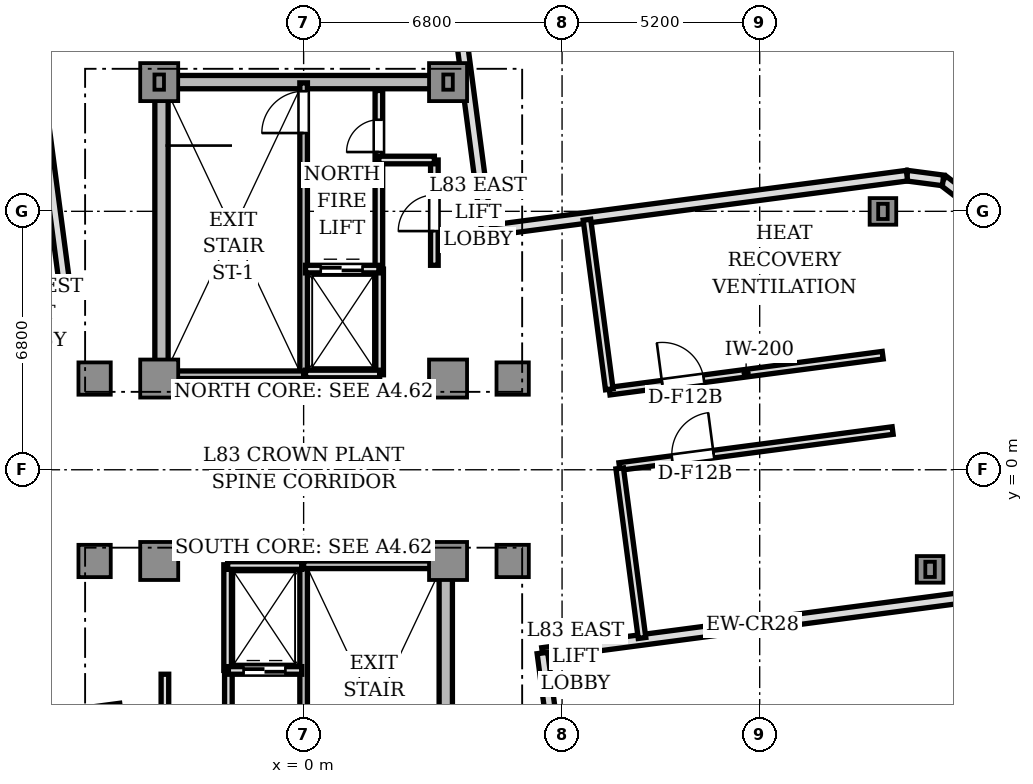
"""IFC4 building model, lengths in metres.
Left out: names, types, materials, properties, quantities, classifications, styles, units other than length and angle.
Written with IfcOpenShell. Run it as: python <this file> out.ifc"""

import sys

from ifc_helpers import new_model, si_unit, direction, frame, frame_2d, origin, origin_2d, place, context, subcontext, project, spatial, polyline, rectangle, i_section, outline, extrude, source, transform, mapped, element, fill, save


model = new_model("IFC4")
c1 = context("Model", 3, precision=1e-05, world=origin(), true_north=direction((0.0, 1.0)))
c2 = subcontext(c1, "Body", "Model", "MODEL_VIEW")
j1 = project(units=[si_unit("LENGTHUNIT", "METRE"), si_unit("PLANEANGLEUNIT", "RADIAN")], contexts=[c1])
p1 = place(None, origin())
s1 = spatial("IfcSite", under=j1, at=p1, CompositionType="ELEMENT")
p2 = place(p1, origin())
s2 = spatial("IfcBuilding", under=s1, at=p2, CompositionType="ELEMENT")
p3 = place(p2, frame((0.0, 0.0, 300.3)))
s3 = spatial("IfcBuildingStorey", under=s2, at=p3, CompositionType="ELEMENT", Elevation=300.3)
p4 = place(p3, frame((-3.55, 10.2, 0.0), z_axis=(0.0, 0.0, 1.0), x_axis=(1.0, 0.0, 0.0)))
e1 = element("IfcWall", 1, at=p4, inside=s3, PredefinedType="SHEAR", context=c2, shape_type="SweptSolid", body=[
    extrude(rectangle(XDim=7.1, YDim=0.35, at=frame_2d((3.55, 0.0))), origin(), (0.0, 0.0, 1.0), 4.25),
])
for number, where, z_axis, x_axis in (
    (2, (-3.74, 2.85, 0.0), (0.0, 0.0, 1.0), (0.0, 1.0, 0.0)),
    (3, (3.74, -9.75, 0.0), (0.0, 0.0, 1.0), (0.0, 1.0, 0.0)),
):
    element("IfcWall", number, at=place(p3, frame(where, z_axis=z_axis, x_axis=x_axis)), inside=s3, PredefinedType="SHEAR", context=c2, shape_type="SweptSolid", body=[
        extrude(rectangle(XDim=6.9, YDim=0.35, at=frame_2d((3.45, 0.0))), origin(), (0.0, 0.0, 1.0), 4.25),
    ])
m1 = source(origin(), c2, "Body", "SweptSolid", [
    extrude(rectangle(XDim=1.0, YDim=1.0, at=origin_2d()), origin(), (0.0, 0.0, 1.0), 4.25),
])
for number, where, z_axis, x_axis in (
    (4, (-3.8, 2.4, 0.0), (0.0, 0.0, 1.0), (1.0, 0.0, 0.0)),
    (5, (3.8, 2.4, 0.0), (0.0, 0.0, 1.0), (1.0, 0.0, 0.0)),
    (6, (-3.8, 10.2, 0.0), (0.0, 0.0, 1.0), (1.0, 0.0, 0.0)),
    (7, (3.8, 10.2, 0.0), (0.0, 0.0, 1.0), (1.0, 0.0, 0.0)),
    (8, (-3.8, -2.4, 0.0), (0.0, 0.0, 1.0), (1.0, 0.0, 0.0)),
    (9, (3.8, -2.4, 0.0), (0.0, 0.0, 1.0), (1.0, 0.0, 0.0)),
):
    element("IfcColumn", number, at=place(p3, frame(where, z_axis=z_axis, x_axis=x_axis)), inside=s3, PredefinedType="COLUMN", context=c2, shape_type="MappedRepresentation", body=[
        mapped(m1, transform((0.0, 0.0, 0.0), scale=1.0)),
    ])
m2 = source(origin(), c2, "Body", "SweptSolid", [
    extrude(rectangle(XDim=0.85, YDim=0.85, at=origin_2d()), origin(), (0.0, 0.0, 1.0), 4.25),
])
for number, where, z_axis, x_axis in (
    (10, (5.5, 2.4, 0.0), (0.0, 0.0, 1.0), (1.0, 0.0, 0.0)),
    (11, (-5.5, 2.4, 0.0), (0.0, 0.0, 1.0), (1.0, 0.0, 0.0)),
    (12, (5.5, -2.4, 0.0), (0.0, 0.0, 1.0), (1.0, 0.0, 0.0)),
    (13, (-5.5, -2.4, 0.0), (0.0, 0.0, 1.0), (1.0, 0.0, 0.0)),
):
    element("IfcColumn", number, at=place(p3, frame(where, z_axis=z_axis, x_axis=x_axis)), inside=s3, PredefinedType="COLUMN", context=c2, shape_type="MappedRepresentation", body=[
        mapped(m2, transform((0.0, 0.0, 0.0), scale=1.0)),
    ])
m3 = source(origin(), c2, "Body", "SweptSolid", [
    extrude(rectangle(XDim=0.7, YDim=0.7, at=origin_2d()), origin(), (0.0, 0.0, 1.0), 4.25),
])
for number, where, z_axis, x_axis in (
    (14, (16.483, -2.621, 0.0), (0.0, 0.0, 1.0), (1.0, 0.0, 0.0)),
    (15, (15.243, 6.798, 0.0), (0.0, 0.0, 1.0), (1.0, 0.0, 0.0)),
):
    element("IfcColumn", number, at=place(p3, frame(where, z_axis=z_axis, x_axis=x_axis)), inside=s3, PredefinedType="COLUMN", context=c2, shape_type="MappedRepresentation", body=[
        mapped(m3, transform((0.0, 0.0, 0.0), scale=1.0)),
    ])
m4 = source(origin(), c2, "Body", "SweptSolid", [
    extrude(i_section(OverallWidth=0.25, OverallDepth=0.4, WebThickness=0.013, FlangeThickness=0.013, FilletRadius=0.014, at=origin_2d()), origin(), (0.0, 0.0, 1.0), 5.959),
])
p5 = place(p3, frame((-3.8, 10.2, 4.25), z_axis=(0.0, 0.0, 1.0), x_axis=(1.0, 0.0, 0.0)))
e16 = element("IfcColumn", 16, at=p5, inside=s3, PredefinedType="COLUMN", context=c2, shape_type="MappedRepresentation", body=[
    mapped(m4, transform((0.0, 0.0, 0.0), scale=1.0)),
])
m5 = source(origin(), c2, "Body", "SweptSolid", [
    extrude(i_section(OverallWidth=0.25, OverallDepth=0.4, WebThickness=0.013, FlangeThickness=0.013, FilletRadius=0.014, at=origin_2d()), origin(), (0.0, 0.0, 1.0), 8.953),
])
p6 = place(p3, frame((3.8, 10.2, 4.25), z_axis=(0.0, 0.0, 1.0), x_axis=(1.0, 0.0, 0.0)))
e17 = element("IfcColumn", 17, at=p6, inside=s3, PredefinedType="COLUMN", context=c2, shape_type="MappedRepresentation", body=[
    mapped(m5, transform((0.0, 0.0, 0.0), scale=1.0)),
])
m6 = source(origin(), c2, "Body", "SweptSolid", [
    extrude(i_section(OverallWidth=0.25, OverallDepth=0.4, WebThickness=0.013, FlangeThickness=0.013, FilletRadius=0.014, at=origin_2d()), origin(), (0.0, 0.0, 1.0), 13.949),
])
p7 = place(p3, frame((16.483, -2.621, 4.25), z_axis=(0.0, 0.0, 1.0), x_axis=(1.0, 0.0, 0.0)))
e18 = element("IfcColumn", 18, at=p7, inside=s3, PredefinedType="COLUMN", context=c2, shape_type="MappedRepresentation", body=[
    mapped(m6, transform((0.0, 0.0, 0.0), scale=1.0)),
])
m7 = source(origin(), c2, "Body", "SweptSolid", [
    extrude(i_section(OverallWidth=0.25, OverallDepth=0.4, WebThickness=0.013, FlangeThickness=0.013, FilletRadius=0.014, at=origin_2d()), origin(), (0.0, 0.0, 1.0), 13.46),
])
p8 = place(p3, frame((15.243, 6.798, 4.25), z_axis=(0.0, 0.0, 1.0), x_axis=(1.0, 0.0, 0.0)))
e19 = element("IfcColumn", 19, at=p8, inside=s3, PredefinedType="COLUMN", context=c2, shape_type="MappedRepresentation", body=[
    mapped(m7, transform((0.0, 0.0, 0.0), scale=1.0)),
])
p9 = place(p3, frame((6.283, -4.821, 0.0), z_axis=(0.0, 0.0, 1.0), x_axis=(0.991445499165, 0.130521347626, 0.0)))
e20 = element("IfcWall", 20, at=p9, inside=s3, PredefinedType="SOLIDWALL", context=c2, shape_type="SweptSolid", body=[
    extrude(outline(polyline([(0.0, 0.0), (11.15, 0.0), (11.15, 18.529), (0.0, 14.175), (0.0, 0.0)])), frame((0.0, 0.14, 0.0), z_axis=(0.0, -1.0, 0.0), x_axis=(1.0, 0.0, 0.0)), (0.0, 0.0, 1.0), 0.28),
])
p10 = place(p3, frame((17.585, 7.031, 0.0), z_axis=(0.0, 0.0, 1.0), x_axis=(-0.793466811674, 0.60861352168, 0.0)))
e21 = element("IfcWall", 21, at=p10, inside=s3, PredefinedType="SOLIDWALL", context=c2, shape_type="SweptSolid", body=[
    extrude(outline(polyline([(0.0, 0.0), (0.958, 0.0), (0.958, 18.328), (0.0, 18.627), (0.0, 0.0)])), frame((0.0, 0.14, 0.0), z_axis=(0.0, -1.0, 0.0), x_axis=(1.0, 0.0, 0.0)), (0.0, 0.0, 1.0), 0.28),
])
p11 = place(p3, frame((16.825, 7.613, 0.0), z_axis=(0.0, 0.0, 1.0), x_axis=(-0.991444747987, 0.130527053476, 0.0)))
e22 = element("IfcWall", 22, at=p11, inside=s3, PredefinedType="SOLIDWALL", context=c2, shape_type="SweptSolid", body=[
    extrude(outline(polyline([(0.0, 0.0), (0.958, 0.0), (0.958, 17.954), (0.0, 18.328), (0.0, 0.0)])), frame((0.0, 0.14, 0.0), z_axis=(0.0, -1.0, 0.0), x_axis=(1.0, 0.0, 0.0)), (0.0, 0.0, 1.0), 0.28),
])
p12 = place(p3, frame((15.876, 7.738, 0.0), z_axis=(0.0, 0.0, 1.0), x_axis=(-0.991445499165, -0.130521347626, 0.0)))
e23 = element("IfcWall", 23, at=p12, inside=s3, PredefinedType="SOLIDWALL", context=c2, shape_type="SweptSolid", body=[
    extrude(outline(polyline([(0.0, 0.0), (11.15, 0.0), (11.15, 13.599), (0.0, 17.954), (0.0, 0.0)])), frame((0.0, 0.14, 0.0), z_axis=(0.0, -1.0, 0.0), x_axis=(1.0, 0.0, 0.0)), (0.0, 0.0, 1.0), 0.28),
])
p13 = place(p3, frame((4.821, 6.283, 0.0), z_axis=(0.0, 0.0, 1.0), x_axis=(-0.130521347626, 0.991445499165, 0.0)))
e24 = element("IfcWall", 24, at=p13, inside=s3, PredefinedType="SOLIDWALL", context=c2, shape_type="SweptSolid", body=[
    extrude(outline(polyline([(0.0, 0.0), (11.15, 0.0), (11.15, 13.026), (0.0, 13.599), (0.0, 0.0)])), frame((0.0, 0.14, 0.0), z_axis=(0.0, -1.0, 0.0), x_axis=(1.0, 0.0, 0.0)), (0.0, 0.0, 1.0), 0.28),
])
p14 = place(p3, frame((-7.738, 15.876, 0.0), z_axis=(0.0, 0.0, 1.0), x_axis=(0.130521347626, -0.991445499165, 0.0)))
e25 = element("IfcWall", 25, at=p14, inside=s3, PredefinedType="SOLIDWALL", context=c2, shape_type="SweptSolid", body=[
    extrude(outline(polyline([(0.0, 0.0), (11.15, 0.0), (11.15, 9.225), (0.0, 8.652), (0.0, 0.0)])), frame((0.0, 0.14, 0.0), z_axis=(0.0, -1.0, 0.0), x_axis=(1.0, 0.0, 0.0)), (0.0, 0.0, 1.0), 0.28),
])
p15 = place(p3, frame((-6.283, 4.821, 0.0), z_axis=(0.0, 0.0, 1.0), x_axis=(-0.991445499165, -0.130521347626, 0.0)))
e26 = element("IfcWall", 26, at=p15, inside=s3, PredefinedType="SOLIDWALL", context=c2, shape_type="SweptSolid", body=[
    extrude(outline(polyline([(0.0, 0.0), (11.15, 0.0), (11.15, 4.871), (0.0, 9.225), (0.0, 0.0)])), frame((0.0, 0.14, 0.0), z_axis=(0.0, -1.0, 0.0), x_axis=(1.0, 0.0, 0.0)), (0.0, 0.0, 1.0), 0.28),
])
p16 = place(p3, frame((-15.876, -7.738, 0.0), z_axis=(0.0, 0.0, 1.0), x_axis=(0.991445499165, 0.130521347626, 0.0)))
e27 = element("IfcWall", 27, at=p16, inside=s3, PredefinedType="SOLIDWALL", context=c2, shape_type="SweptSolid", body=[
    extrude(outline(polyline([(0.0, 0.0), (11.15, 0.0), (11.15, 9.801), (0.0, 5.446), (0.0, 0.0)])), frame((0.0, 0.14, 0.0), z_axis=(0.0, -1.0, 0.0), x_axis=(1.0, 0.0, 0.0)), (0.0, 0.0, 1.0), 0.28),
])
p17 = place(p3, frame((7.738, -15.876, 0.0), z_axis=(0.0, 0.0, 1.0), x_axis=(-0.130521347626, 0.991445499165, 0.0)))
e28 = element("IfcWall", 28, at=p17, inside=s3, PredefinedType="SOLIDWALL", context=c2, shape_type="SweptSolid", body=[
    extrude(outline(polyline([(0.0, 0.0), (11.15, 0.0), (11.15, 14.175), (0.0, 14.748), (0.0, 0.0)])), frame((0.0, 0.14, 0.0), z_axis=(0.0, -1.0, 0.0), x_axis=(1.0, 0.0, 0.0)), (0.0, 0.0, 1.0), 0.28),
])
p18 = place(p3, frame((0.0, 2.5, 0.0), z_axis=(0.0, 0.0, 1.0), x_axis=(0.0, 1.0, 0.0)))
e29 = element("IfcWall", 29, at=p18, inside=s3, PredefinedType="SOLIDWALL", context=c2, shape_type="SweptSolid", body=[
    extrude(rectangle(XDim=7.68, YDim=0.2, at=frame_2d((3.84, 0.0))), origin(), (0.0, 0.0, 1.0), 4.15),
])
p19 = place(p18, frame((6.36, 0.0, 0.0)))
e30 = element("IfcOpeningElement", 30, at=p19, cuts=e29, PredefinedType="OPENING", context=c2, shape_type="SweptSolid", body=[
    extrude(rectangle(XDim=1.1, YDim=2.15, at=frame_2d((0.55, 1.075))), frame((0.0, 0.11, 0.0), z_axis=(0.0, -1.0, 0.0), x_axis=(1.0, 0.0, 0.0)), (0.0, 0.0, 1.0), 0.22),
])
p20 = place(p3, frame((-3.72, 2.5, 0.0), z_axis=(0.0, 0.0, 1.0), x_axis=(1.0, 0.0, 0.0)))
e31 = element("IfcWall", 31, at=p20, inside=s3, PredefinedType="SOLIDWALL", context=c2, shape_type="SweptSolid", body=[
    extrude(rectangle(XDim=3.72, YDim=0.2, at=frame_2d((1.86, 0.0))), origin(), (0.0, 0.0, 1.0), 4.15),
])
p21 = place(p3, frame((0.0, -10.18, 0.0), z_axis=(0.0, 0.0, 1.0), x_axis=(0.0, 1.0, 0.0)))
e32 = element("IfcWall", 32, at=p21, inside=s3, PredefinedType="SOLIDWALL", context=c2, shape_type="SweptSolid", body=[
    extrude(rectangle(XDim=7.68, YDim=0.2, at=frame_2d((3.84, 0.0))), origin(), (0.0, 0.0, 1.0), 4.15),
])
p22 = place(p21, frame((0.28, 0.0, 0.0)))
e33 = element("IfcOpeningElement", 33, at=p22, cuts=e32, PredefinedType="OPENING", context=c2, shape_type="SweptSolid", body=[
    extrude(rectangle(XDim=1.1, YDim=2.15, at=frame_2d((0.55, 1.075))), frame((0.0, 0.11, 0.0), z_axis=(0.0, -1.0, 0.0), x_axis=(1.0, 0.0, 0.0)), (0.0, 0.0, 1.0), 0.22),
])
p23 = place(p3, frame((0.0, -2.5, 0.0), z_axis=(0.0, 0.0, 1.0), x_axis=(1.0, 0.0, 0.0)))
e34 = element("IfcWall", 34, at=p23, inside=s3, PredefinedType="SOLIDWALL", context=c2, shape_type="SweptSolid", body=[
    extrude(rectangle(XDim=3.72, YDim=0.2, at=frame_2d((1.86, 0.0))), origin(), (0.0, 0.0, 1.0), 4.15),
])
p24 = place(p3, frame((1.98, 5.32, 0.0), z_axis=(0.0, 0.0, 1.0), x_axis=(0.0, 1.0, 0.0)))
e35 = element("IfcWall", 35, at=p24, inside=s3, PredefinedType="SOLIDWALL", context=c2, shape_type="SweptSolid", body=[
    extrude(rectangle(XDim=4.66, YDim=0.2, at=frame_2d((2.33, 0.0))), origin(), (0.0, 0.0, 1.0), 3.7),
])
p25 = place(p24, frame((3.04, 0.0, 0.0)))
e36 = element("IfcOpeningElement", 36, at=p25, cuts=e35, PredefinedType="OPENING", context=c2, shape_type="SweptSolid", body=[
    extrude(rectangle(XDim=0.85, YDim=2.1, at=frame_2d((0.425, 1.05))), frame((0.0, 0.11, 0.0), z_axis=(0.0, -1.0, 0.0), x_axis=(1.0, 0.0, 0.0)), (0.0, 0.0, 1.0), 0.22),
])
p26 = place(p3, frame((-1.98, -9.98, 0.0), z_axis=(0.0, 0.0, 1.0), x_axis=(0.0, 1.0, 0.0)))
e37 = element("IfcWall", 37, at=p26, inside=s3, PredefinedType="SOLIDWALL", context=c2, shape_type="SweptSolid", body=[
    extrude(rectangle(XDim=4.66, YDim=0.2, at=frame_2d((2.33, 0.0))), origin(), (0.0, 0.0, 1.0), 3.7),
])
p27 = place(p26, frame((0.2, 0.0, 0.0)))
e38 = element("IfcOpeningElement", 38, at=p27, cuts=e37, PredefinedType="OPENING", context=c2, shape_type="SweptSolid", body=[
    extrude(rectangle(XDim=0.85, YDim=2.1, at=frame_2d((0.425, 1.05))), frame((0.0, 0.11, 0.0), z_axis=(0.0, -1.0, 0.0), x_axis=(1.0, 0.0, 0.0)), (0.0, 0.0, 1.0), 0.22),
])
p28 = place(p3, frame((2.0, 2.5, 0.0), z_axis=(0.0, 0.0, 1.0), x_axis=(0.0, 1.0, 0.0)))
e39 = element("IfcWall", 39, at=p28, inside=s3, PredefinedType="SOLIDWALL", context=c2, shape_type="SweptSolid", body=[
    extrude(rectangle(XDim=2.78, YDim=0.2, at=frame_2d((1.39, 0.0))), origin(), (0.0, 0.0, 1.0), 3.7),
])
p29 = place(p3, frame((0.05, 2.52, 0.0), z_axis=(0.0, 0.0, 1.0), x_axis=(1.0, 0.0, 0.0)))
e40 = element("IfcWall", 40, at=p29, inside=s3, PredefinedType="SOLIDWALL", context=c2, shape_type="SweptSolid", body=[
    extrude(rectangle(XDim=1.95, YDim=0.2, at=frame_2d((0.975, 0.0))), origin(), (0.0, 0.0, 1.0), 3.7),
])
p30 = place(p3, frame((0.05, 5.28, 0.0), z_axis=(0.0, 0.0, 1.0), x_axis=(1.0, 0.0, 0.0)))
e41 = element("IfcWall", 41, at=p30, inside=s3, PredefinedType="SOLIDWALL", context=c2, shape_type="SweptSolid", body=[
    extrude(rectangle(XDim=1.93, YDim=0.2, at=frame_2d((0.965, 0.0))), origin(), (0.0, 0.0, 1.0), 3.7),
])
p31 = place(p30, frame((0.4, 0.0, 0.0)))
e42 = element("IfcOpeningElement", 42, at=p31, cuts=e41, PredefinedType="OPENING", context=c2, shape_type="SweptSolid", body=[
    extrude(rectangle(XDim=1.1, YDim=2.2, at=frame_2d((0.55, 1.1))), frame((0.0, 0.11, 0.0), z_axis=(0.0, -1.0, 0.0), x_axis=(1.0, 0.0, 0.0)), (0.0, 0.0, 1.0), 0.22),
])
p32 = place(p3, frame((-2.0, -5.28, 0.0), z_axis=(0.0, 0.0, 1.0), x_axis=(0.0, 1.0, 0.0)))
e43 = element("IfcWall", 43, at=p32, inside=s3, PredefinedType="SOLIDWALL", context=c2, shape_type="SweptSolid", body=[
    extrude(rectangle(XDim=2.78, YDim=0.2, at=frame_2d((1.39, 0.0))), origin(), (0.0, 0.0, 1.0), 3.7),
])
p33 = place(p3, frame((-2.0, -2.52, 0.0), z_axis=(0.0, 0.0, 1.0), x_axis=(1.0, 0.0, 0.0)))
e44 = element("IfcWall", 44, at=p33, inside=s3, PredefinedType="SOLIDWALL", context=c2, shape_type="SweptSolid", body=[
    extrude(rectangle(XDim=1.95, YDim=0.2, at=frame_2d((0.975, 0.0))), origin(), (0.0, 0.0, 1.0), 3.7),
])
p34 = place(p3, frame((-1.98, -5.28, 0.0), z_axis=(0.0, 0.0, 1.0), x_axis=(1.0, 0.0, 0.0)))
e45 = element("IfcWall", 45, at=p34, inside=s3, PredefinedType="SOLIDWALL", context=c2, shape_type="SweptSolid", body=[
    extrude(rectangle(XDim=1.93, YDim=0.2, at=frame_2d((0.965, 0.0))), origin(), (0.0, 0.0, 1.0), 3.7),
])
p35 = place(p34, frame((0.4, 0.0, 0.0)))
e46 = element("IfcOpeningElement", 46, at=p35, cuts=e45, PredefinedType="OPENING", context=c2, shape_type="SweptSolid", body=[
    extrude(rectangle(XDim=1.1, YDim=2.2, at=frame_2d((0.55, 1.1))), frame((0.0, 0.11, 0.0), z_axis=(0.0, -1.0, 0.0), x_axis=(1.0, 0.0, 0.0)), (0.0, 0.0, 1.0), 0.22),
])
p36 = place(p3, frame((3.44, 5.38, 0.0), z_axis=(0.0, 0.0, 1.0), x_axis=(0.0, 1.0, 0.0)))
e47 = element("IfcWall", 47, at=p36, inside=s3, PredefinedType="SOLIDWALL", context=c2, shape_type="SweptSolid", body=[
    extrude(rectangle(XDim=2.77, YDim=0.2, at=frame_2d((1.385, 0.0))), origin(), (0.0, 0.0, 1.0), 3.7),
])
p37 = place(p36, frame((0.9, 0.0, 0.0)))
e48 = element("IfcOpeningElement", 48, at=p37, cuts=e47, PredefinedType="OPENING", context=c2, shape_type="SweptSolid", body=[
    extrude(rectangle(XDim=0.95, YDim=2.15, at=frame_2d((0.475, 1.075))), frame((0.0, 0.11, 0.0), z_axis=(0.0, -1.0, 0.0), x_axis=(1.0, 0.0, 0.0)), (0.0, 0.0, 1.0), 0.22),
])
p38 = place(p3, frame((1.98, 8.15, 0.0), z_axis=(0.0, 0.0, 1.0), x_axis=(1.0, 0.0, 0.0)))
e49 = element("IfcWall", 49, at=p38, inside=s3, PredefinedType="SOLIDWALL", context=c2, shape_type="SweptSolid", body=[
    extrude(rectangle(XDim=1.46, YDim=0.2, at=frame_2d((0.73, 0.0))), origin(), (0.0, 0.0, 1.0), 3.7),
])
p39 = place(p3, frame((-3.65, -8.81, 0.0), z_axis=(0.0, 0.0, 1.0), x_axis=(0.0, 1.0, 0.0)))
e50 = element("IfcWall", 50, at=p39, inside=s3, PredefinedType="SOLIDWALL", context=c2, shape_type="SweptSolid", body=[
    extrude(rectangle(XDim=3.43, YDim=0.2, at=frame_2d((1.715, 0.0))), origin(), (0.0, 0.0, 1.0), 3.7),
])
p40 = place(p39, frame((1.2, 0.0, 0.0)))
e51 = element("IfcOpeningElement", 51, at=p40, cuts=e50, PredefinedType="OPENING", context=c2, shape_type="SweptSolid", body=[
    extrude(rectangle(XDim=0.95, YDim=2.15, at=frame_2d((0.475, 1.075))), frame((0.0, 0.11, 0.0), z_axis=(0.0, -1.0, 0.0), x_axis=(1.0, 0.0, 0.0)), (0.0, 0.0, 1.0), 0.22),
])
p41 = place(p3, frame((8.049, 2.068, 0.0), z_axis=(0.0, 0.0, 1.0), x_axis=(0.991445353075, 0.130522457324, 0.0)))
e52 = element("IfcWall", 52, at=p41, inside=s3, PredefinedType="SOLIDWALL", context=c2, shape_type="SweptSolid", body=[
    extrude(rectangle(XDim=7.25, YDim=0.2, at=frame_2d((3.625, 0.0))), origin(), (0.0, 0.0, 1.0), 3.7),
])
p42 = place(p41, frame((1.4, 0.0, 0.0)))
e53 = element("IfcOpeningElement", 53, at=p42, cuts=e52, PredefinedType="OPENING", context=c2, shape_type="SweptSolid", body=[
    extrude(rectangle(XDim=1.1, YDim=2.15, at=frame_2d((0.55, 1.075))), frame((0.0, 0.11, 0.0), z_axis=(0.0, -1.0, 0.0), x_axis=(1.0, 0.0, 0.0)), (0.0, 0.0, 1.0), 0.22),
])
p43 = place(p3, frame((8.042, 2.118, 0.0), z_axis=(0.0, 0.0, 1.0), x_axis=(-0.130535912089, 0.99144358168, 0.0)))
e54 = element("IfcWall", 54, at=p43, inside=s3, PredefinedType="SOLIDWALL", context=c2, shape_type="SweptSolid", body=[
    extrude(rectangle(XDim=4.5, YDim=0.2, at=frame_2d((2.25, 0.0))), origin(), (0.0, 0.0, 1.0), 3.7),
])
p44 = place(p3, frame((8.31, 0.085, 0.0), z_axis=(0.0, 0.0, 1.0), x_axis=(0.991445353075, 0.130522457324, 0.0)))
e55 = element("IfcWall", 55, at=p44, inside=s3, PredefinedType="SOLIDWALL", context=c2, shape_type="SweptSolid", body=[
    extrude(rectangle(XDim=7.25, YDim=0.2, at=frame_2d((3.625, 0.0))), origin(), (0.0, 0.0, 1.0), 3.7),
])
p45 = place(p44, frame((1.4, 0.0, 0.0)))
e56 = element("IfcOpeningElement", 56, at=p45, cuts=e55, PredefinedType="OPENING", context=c2, shape_type="SweptSolid", body=[
    extrude(rectangle(XDim=1.1, YDim=2.15, at=frame_2d((0.55, 1.075))), frame((0.0, 0.11, 0.0), z_axis=(0.0, -1.0, 0.0), x_axis=(1.0, 0.0, 0.0)), (0.0, 0.0, 1.0), 0.22),
])
p46 = place(p3, frame((8.904, -4.426, 0.0), z_axis=(0.0, 0.0, 1.0), x_axis=(-0.130528890923, 0.991444506079, 0.0)))
e57 = element("IfcWall", 57, at=p46, inside=s3, PredefinedType="SOLIDWALL", context=c2, shape_type="SweptSolid", body=[
    extrude(rectangle(XDim=4.5, YDim=0.2, at=frame_2d((2.25, 0.0))), origin(), (0.0, 0.0, 1.0), 3.7),
])
m8 = source(origin(), c2, "Body", "SweptSolid", [
    extrude(rectangle(XDim=1.1, YDim=0.05, at=origin_2d()), origin(), (0.0, 0.0, 1.0), 2.15),
])
p47 = place(p19, frame((0.55, 0.0, 0.0)))
e58 = element("IfcDoor", 58, at=p47, inside=s3, OperationType="SINGLE_SWING_LEFT", PredefinedType="DOOR", context=c2, shape_type="MappedRepresentation", body=[
    mapped(m8, transform((0.0, 0.0, 0.0), scale=1.0)),
])
fill(e30, e58)
m9 = source(origin(), c2, "Body", "SweptSolid", [
    extrude(rectangle(XDim=0.85, YDim=0.05, at=origin_2d()), origin(), (0.0, 0.0, 1.0), 2.1),
])
p48 = place(p25, frame((0.425, 0.0, 0.0)))
e59 = element("IfcDoor", 59, at=p48, inside=s3, OperationType="SINGLE_SWING_LEFT", PredefinedType="DOOR", context=c2, shape_type="MappedRepresentation", body=[
    mapped(m9, transform((0.0, 0.0, 0.0), scale=1.0)),
])
fill(e36, e59)
m10 = source(origin(), c2, "Body", "SweptSolid", [
    extrude(rectangle(XDim=1.1, YDim=0.05, at=origin_2d()), origin(), (0.0, 0.0, 1.0), 2.2),
])
p49 = place(p31, frame((0.55, 0.0, 0.0)))
e60 = element("IfcDoor", 60, at=p49, inside=s3, OperationType="DOUBLE_DOOR_SLIDING", PredefinedType="DOOR", context=c2, shape_type="MappedRepresentation", body=[
    mapped(m10, transform((0.0, 0.0, 0.0), scale=1.0)),
])
fill(e42, e60)
p50 = place(p35, frame((0.55, 0.0, 0.0)))
e61 = element("IfcDoor", 61, at=p50, inside=s3, OperationType="DOUBLE_DOOR_SLIDING", PredefinedType="DOOR", context=c2, shape_type="MappedRepresentation", body=[
    mapped(m10, transform((0.0, 0.0, 0.0), scale=1.0)),
])
fill(e46, e61)
m11 = source(origin(), c2, "Body", "SweptSolid", [
    extrude(rectangle(XDim=0.95, YDim=0.05, at=origin_2d()), origin(), (0.0, 0.0, 1.0), 2.15),
])
p51 = place(p37, frame((0.475, 0.0, 0.0)))
e62 = element("IfcDoor", 62, at=p51, inside=s3, OperationType="SINGLE_SWING_LEFT", PredefinedType="DOOR", context=c2, shape_type="MappedRepresentation", body=[
    mapped(m11, transform((0.0, 0.0, 0.0), scale=1.0)),
])
fill(e48, e62)
p52 = place(p42, frame((0.55, 0.0, 0.0)))
e63 = element("IfcDoor", 63, at=p52, inside=s3, OperationType="SINGLE_SWING_LEFT", PredefinedType="DOOR", context=c2, shape_type="MappedRepresentation", body=[
    mapped(m8, transform((0.0, 0.0, 0.0), scale=1.0)),
])
fill(e53, e63)
p53 = place(p45, frame((0.55, 0.0, 0.0)))
e64 = element("IfcDoor", 64, at=p53, inside=s3, OperationType="SINGLE_SWING_RIGHT", PredefinedType="DOOR", context=c2, shape_type="MappedRepresentation", body=[
    mapped(m8, transform((0.0, 0.0, 0.0), scale=1.0)),
])
fill(e56, e64)
save(model, sys.argv[1])
